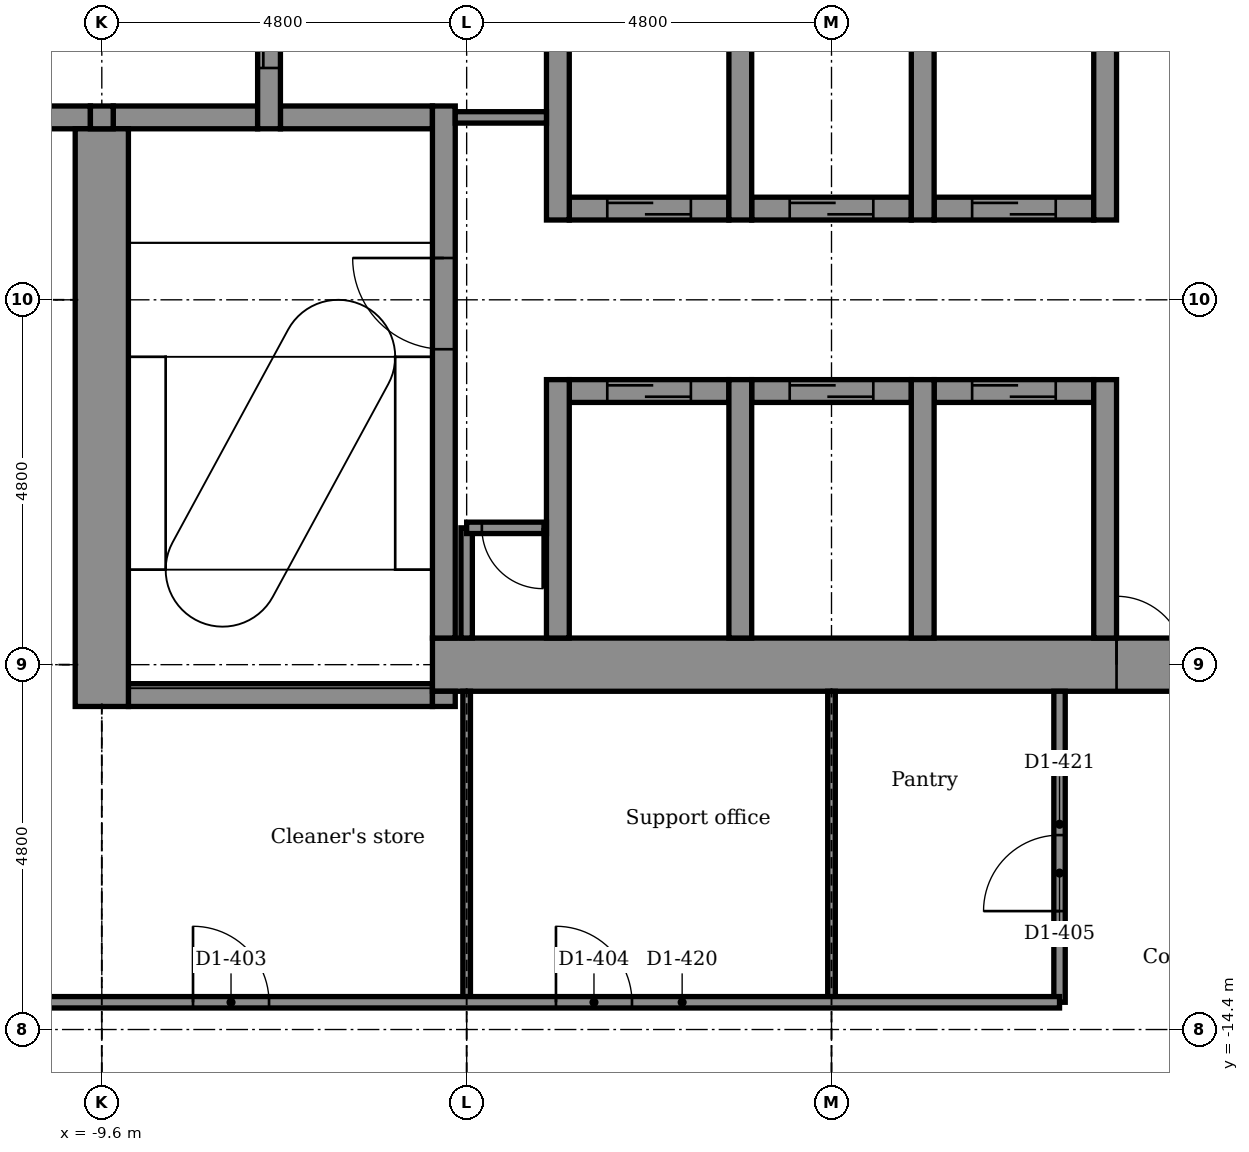
"""IFC4 building model, lengths in metres.
Left out: names, types, materials, properties, quantities, classifications, styles, units other than length and angle.
Written with IfcOpenShell. Run it as: python <this file> out.ifc"""

import sys

from ifc_helpers import new_model, si_unit, direction, frame, frame_2d, origin, place, context, subcontext, project, spatial, rectangle, extrude, element, fill, save


model = new_model("IFC4")
c1 = context("Model", 3, precision=1e-05, world=origin(), true_north=direction((0.0, 1.0)))
c2 = subcontext(c1, "Body", "Model", "MODEL_VIEW")
j1 = project(units=[si_unit("LENGTHUNIT", "METRE"), si_unit("PLANEANGLEUNIT", "RADIAN")], contexts=[c1])
p1 = place(None, origin())
s1 = spatial("IfcSite", under=j1, at=p1, CompositionType="ELEMENT")
p2 = place(p1, origin())
s2 = spatial("IfcBuilding", under=s1, at=p2, CompositionType="ELEMENT")
p3 = place(p2, frame((0.0, 0.0, 138.8)))
s3 = spatial("IfcBuildingStorey", under=s2, at=p3, CompositionType="ELEMENT", Elevation=138.8)
p4 = place(p3, frame((-9.25, -10.0, -0.15), z_axis=(0.0, 0.0, 1.0), x_axis=(1.0, 0.0, 0.0)))
e1 = element("IfcWall", 1, at=p4, inside=s3, PredefinedType="STANDARD", context=c2, shape_type="SweptSolid", body=[
    extrude(rectangle(XDim=4.0, YDim=0.3, at=frame_2d((2.0, 0.0))), origin(), (0.0, 0.0, 1.0), 3.9),
])
p5 = place(p3, frame((-5.25, -9.6, -0.15), z_axis=(0.0, 0.0, 1.0), x_axis=(1.0, 0.0, 0.0)))
e2 = element("IfcWall", 2, at=p5, inside=s3, PredefinedType="SHEAR", context=c2, shape_type="SweptSolid", body=[
    extrude(rectangle(XDim=10.2, YDim=0.7, at=frame_2d((5.1, 0.0))), origin(), (0.0, 0.0, 1.0), 3.9),
])
p6 = place(p5, frame((9.0, 0.0, 0.15)))
e3 = element("IfcOpeningElement", 3, at=p6, cuts=e2, PredefinedType="OPENING", context=c2, shape_type="SweptSolid", body=[
    extrude(rectangle(XDim=0.9, YDim=2.1, at=frame_2d((0.45, 1.05))), frame((0.0, 0.36, 0.0), z_axis=(0.0, -1.0, 0.0), x_axis=(1.0, 0.0, 0.0)), (0.0, 0.0, 1.0), 0.72),
])
p7 = place(p3, frame((-3.45, -6.0, -0.15), z_axis=(0.0, 0.0, 1.0), x_axis=(1.0, 0.0, 0.0)))
e4 = element("IfcWall", 4, at=p7, inside=s3, PredefinedType="STANDARD", context=c2, shape_type="SweptSolid", body=[
    extrude(rectangle(XDim=2.1, YDim=0.3, at=frame_2d((1.05, 0.0))), origin(), (0.0, 0.0, 1.0), 3.9),
])
p8 = place(p7, frame((0.5, 0.0, 0.15)))
e5 = element("IfcOpeningElement", 5, at=p8, cuts=e4, PredefinedType="OPENING", context=c2, shape_type="SweptSolid", body=[
    extrude(rectangle(XDim=1.1, YDim=2.1, at=frame_2d((0.55, 1.05))), frame((0.0, 0.16, 0.0), z_axis=(0.0, -1.0, 0.0), x_axis=(1.0, 0.0, 0.0)), (0.0, 0.0, 1.0), 0.32),
])
p9 = place(p3, frame((-1.05, -6.0, -0.15), z_axis=(0.0, 0.0, 1.0), x_axis=(1.0, 0.0, 0.0)))
e6 = element("IfcWall", 6, at=p9, inside=s3, PredefinedType="STANDARD", context=c2, shape_type="SweptSolid", body=[
    extrude(rectangle(XDim=2.1, YDim=0.3, at=frame_2d((1.05, 0.0))), origin(), (0.0, 0.0, 1.0), 3.9),
])
p10 = place(p9, frame((0.5, 0.0, 0.15)))
e7 = element("IfcOpeningElement", 7, at=p10, cuts=e6, PredefinedType="OPENING", context=c2, shape_type="SweptSolid", body=[
    extrude(rectangle(XDim=1.1, YDim=2.1, at=frame_2d((0.55, 1.05))), frame((0.0, 0.16, 0.0), z_axis=(0.0, -1.0, 0.0), x_axis=(1.0, 0.0, 0.0)), (0.0, 0.0, 1.0), 0.32),
])
p11 = place(p3, frame((1.35, -6.0, -0.15), z_axis=(0.0, 0.0, 1.0), x_axis=(1.0, 0.0, 0.0)))
e8 = element("IfcWall", 8, at=p11, inside=s3, PredefinedType="STANDARD", context=c2, shape_type="SweptSolid", body=[
    extrude(rectangle(XDim=2.1, YDim=0.3, at=frame_2d((1.05, 0.0))), origin(), (0.0, 0.0, 1.0), 3.9),
])
p12 = place(p11, frame((0.5, 0.0, 0.15)))
e9 = element("IfcOpeningElement", 9, at=p12, cuts=e8, PredefinedType="OPENING", context=c2, shape_type="SweptSolid", body=[
    extrude(rectangle(XDim=1.1, YDim=2.1, at=frame_2d((0.55, 1.05))), frame((0.0, 0.16, 0.0), z_axis=(0.0, -1.0, 0.0), x_axis=(1.0, 0.0, 0.0)), (0.0, 0.0, 1.0), 0.32),
])
p13 = place(p3, frame((-3.45, -3.6, -0.15), z_axis=(0.0, 0.0, 1.0), x_axis=(1.0, 0.0, 0.0)))
e10 = element("IfcWall", 10, at=p13, inside=s3, PredefinedType="STANDARD", context=c2, shape_type="SweptSolid", body=[
    extrude(rectangle(XDim=2.1, YDim=0.3, at=frame_2d((1.05, 0.0))), origin(), (0.0, 0.0, 1.0), 3.9),
])
p14 = place(p13, frame((0.5, 0.0, 0.15)))
e11 = element("IfcOpeningElement", 11, at=p14, cuts=e10, PredefinedType="OPENING", context=c2, shape_type="SweptSolid", body=[
    extrude(rectangle(XDim=1.1, YDim=2.1, at=frame_2d((0.55, 1.05))), frame((0.0, 0.16, 0.0), z_axis=(0.0, -1.0, 0.0), x_axis=(1.0, 0.0, 0.0)), (0.0, 0.0, 1.0), 0.32),
])
p15 = place(p3, frame((-1.05, -3.6, -0.15), z_axis=(0.0, 0.0, 1.0), x_axis=(1.0, 0.0, 0.0)))
e12 = element("IfcWall", 12, at=p15, inside=s3, PredefinedType="STANDARD", context=c2, shape_type="SweptSolid", body=[
    extrude(rectangle(XDim=2.1, YDim=0.3, at=frame_2d((1.05, 0.0))), origin(), (0.0, 0.0, 1.0), 3.9),
])
p16 = place(p15, frame((0.5, 0.0, 0.15)))
e13 = element("IfcOpeningElement", 13, at=p16, cuts=e12, PredefinedType="OPENING", context=c2, shape_type="SweptSolid", body=[
    extrude(rectangle(XDim=1.1, YDim=2.1, at=frame_2d((0.55, 1.05))), frame((0.0, 0.16, 0.0), z_axis=(0.0, -1.0, 0.0), x_axis=(1.0, 0.0, 0.0)), (0.0, 0.0, 1.0), 0.32),
])
p17 = place(p3, frame((1.35, -3.6, -0.15), z_axis=(0.0, 0.0, 1.0), x_axis=(1.0, 0.0, 0.0)))
e14 = element("IfcWall", 14, at=p17, inside=s3, PredefinedType="STANDARD", context=c2, shape_type="SweptSolid", body=[
    extrude(rectangle(XDim=2.1, YDim=0.3, at=frame_2d((1.05, 0.0))), origin(), (0.0, 0.0, 1.0), 3.9),
])
p18 = place(p17, frame((0.5, 0.0, 0.15)))
e15 = element("IfcOpeningElement", 15, at=p18, cuts=e14, PredefinedType="OPENING", context=c2, shape_type="SweptSolid", body=[
    extrude(rectangle(XDim=1.1, YDim=2.1, at=frame_2d((0.55, 1.05))), frame((0.0, 0.16, 0.0), z_axis=(0.0, -1.0, 0.0), x_axis=(1.0, 0.0, 0.0)), (0.0, 0.0, 1.0), 0.32),
])
p19 = place(p3, frame((-10.85, -2.4, -0.15), z_axis=(0.0, 0.0, 1.0), x_axis=(1.0, 0.0, 0.0)))
e16 = element("IfcWall", 16, at=p19, inside=s3, PredefinedType="STANDARD", context=c2, shape_type="SweptSolid", body=[
    extrude(rectangle(XDim=1.1, YDim=0.3, at=frame_2d((0.55, 0.0))), origin(), (0.0, 0.0, 1.0), 3.9),
])
p20 = place(p3, frame((-9.45, -2.4, -0.15), z_axis=(0.0, 0.0, 1.0), x_axis=(1.0, 0.0, 0.0)))
e17 = element("IfcWall", 17, at=p20, inside=s3, PredefinedType="STANDARD", context=c2, shape_type="SweptSolid", body=[
    extrude(rectangle(XDim=1.9, YDim=0.3, at=frame_2d((0.95, 0.0))), origin(), (0.0, 0.0, 1.0), 3.9),
])
p21 = place(p3, frame((-7.25, -2.4, -0.15), z_axis=(0.0, 0.0, 1.0), x_axis=(1.0, 0.0, 0.0)))
e18 = element("IfcWall", 18, at=p21, inside=s3, PredefinedType="STANDARD", context=c2, shape_type="SweptSolid", body=[
    extrude(rectangle(XDim=2.0, YDim=0.3, at=frame_2d((1.0, 0.0))), origin(), (0.0, 0.0, 1.0), 3.9),
])
p22 = place(p3, frame((-9.6, -10.15, -0.15), z_axis=(0.0, 0.0, 1.0), x_axis=(0.0, 1.0, 0.0)))
e19 = element("IfcWall", 19, at=p22, inside=s3, PredefinedType="SHEAR", context=c2, shape_type="SweptSolid", body=[
    extrude(rectangle(XDim=7.6, YDim=0.7, at=frame_2d((3.8, 0.0))), origin(), (0.0, 0.0, 1.0), 3.9),
])
p23 = place(p3, frame((-9.6, -2.55, -0.15), z_axis=(0.0, 0.0, 1.0), x_axis=(0.0, 1.0, 0.0)))
e20 = element("IfcWall", 20, at=p23, inside=s3, PredefinedType="STANDARD", context=c2, shape_type="SweptSolid", body=[
    extrude(rectangle(XDim=0.3, YDim=0.3, at=frame_2d((0.15, 0.0))), origin(), (0.0, 0.0, 1.0), 3.9),
])
p24 = place(p3, frame((-7.4, -2.55, -0.15), z_axis=(0.0, 0.0, 1.0), x_axis=(0.0, 1.0, 0.0)))
e21 = element("IfcWall", 21, at=p24, inside=s3, PredefinedType="STANDARD", context=c2, shape_type="SweptSolid", body=[
    extrude(rectangle(XDim=5.1, YDim=0.3, at=frame_2d((2.55, 0.0))), origin(), (0.0, 0.0, 1.0), 3.9),
])
p25 = place(p24, frame((0.8, 0.0, 0.15)))
e22 = element("IfcOpeningElement", 22, at=p25, cuts=e21, PredefinedType="OPENING", context=c2, shape_type="SweptSolid", body=[
    extrude(rectangle(XDim=1.1, YDim=2.1, at=frame_2d((0.55, 1.05))), frame((0.0, 0.16, 0.0), z_axis=(0.0, -1.0, 0.0), x_axis=(1.0, 0.0, 0.0)), (0.0, 0.0, 1.0), 0.32),
])
p26 = place(p24, frame((3.2, 0.0, 0.15)))
e23 = element("IfcOpeningElement", 23, at=p26, cuts=e21, PredefinedType="OPENING", context=c2, shape_type="SweptSolid", body=[
    extrude(rectangle(XDim=1.1, YDim=2.1, at=frame_2d((0.55, 1.05))), frame((0.0, 0.16, 0.0), z_axis=(0.0, -1.0, 0.0), x_axis=(1.0, 0.0, 0.0)), (0.0, 0.0, 1.0), 0.32),
])
p27 = place(p3, frame((-5.1, -10.15, -0.15), z_axis=(0.0, 0.0, 1.0), x_axis=(0.0, 1.0, 0.0)))
e24 = element("IfcWall", 24, at=p27, inside=s3, PredefinedType="STANDARD", context=c2, shape_type="SweptSolid", body=[
    extrude(rectangle(XDim=0.2, YDim=0.3, at=frame_2d((0.1, 0.0))), origin(), (0.0, 0.0, 1.0), 3.9),
])
p28 = place(p3, frame((-5.1, -9.25, -0.15), z_axis=(0.0, 0.0, 1.0), x_axis=(0.0, 1.0, 0.0)))
e25 = element("IfcWall", 25, at=p28, inside=s3, PredefinedType="STANDARD", context=c2, shape_type="SweptSolid", body=[
    extrude(rectangle(XDim=7.0, YDim=0.3, at=frame_2d((3.5, 0.0))), origin(), (0.0, 0.0, 1.0), 3.9),
])
p29 = place(p28, frame((3.8, 0.0, 0.15)))
e26 = element("IfcOpeningElement", 26, at=p29, cuts=e25, PredefinedType="OPENING", context=c2, shape_type="SweptSolid", body=[
    extrude(rectangle(XDim=1.2, YDim=2.1, at=frame_2d((0.6, 1.05))), frame((0.0, 0.16, 0.0), z_axis=(0.0, -1.0, 0.0), x_axis=(1.0, 0.0, 0.0)), (0.0, 0.0, 1.0), 0.32),
])
p30 = place(p3, frame((-3.6, -9.25, -0.15), z_axis=(0.0, 0.0, 1.0), x_axis=(0.0, 1.0, 0.0)))
e27 = element("IfcWall", 27, at=p30, inside=s3, PredefinedType="STANDARD", context=c2, shape_type="SweptSolid", body=[
    extrude(rectangle(XDim=3.4, YDim=0.3, at=frame_2d((1.7, 0.0))), origin(), (0.0, 0.0, 1.0), 3.9),
])
p31 = place(p3, frame((-3.6, -3.75, -0.15), z_axis=(0.0, 0.0, 1.0), x_axis=(0.0, 1.0, 0.0)))
e28 = element("IfcWall", 28, at=p31, inside=s3, PredefinedType="STANDARD", context=c2, shape_type="SweptSolid", body=[
    extrude(rectangle(XDim=7.5, YDim=0.3, at=frame_2d((3.75, 0.0))), origin(), (0.0, 0.0, 1.0), 3.9),
])
p32 = place(p3, frame((-1.2, -9.25, -0.15), z_axis=(0.0, 0.0, 1.0), x_axis=(0.0, 1.0, 0.0)))
e29 = element("IfcWall", 29, at=p32, inside=s3, PredefinedType="STANDARD", context=c2, shape_type="SweptSolid", body=[
    extrude(rectangle(XDim=3.4, YDim=0.3, at=frame_2d((1.7, 0.0))), origin(), (0.0, 0.0, 1.0), 3.9),
])
p33 = place(p3, frame((-1.2, -3.75, -0.15), z_axis=(0.0, 0.0, 1.0), x_axis=(0.0, 1.0, 0.0)))
e30 = element("IfcWall", 30, at=p33, inside=s3, PredefinedType="STANDARD", context=c2, shape_type="SweptSolid", body=[
    extrude(rectangle(XDim=7.5, YDim=0.3, at=frame_2d((3.75, 0.0))), origin(), (0.0, 0.0, 1.0), 3.9),
])
p34 = place(p3, frame((1.2, -9.25, -0.15), z_axis=(0.0, 0.0, 1.0), x_axis=(0.0, 1.0, 0.0)))
e31 = element("IfcWall", 31, at=p34, inside=s3, PredefinedType="STANDARD", context=c2, shape_type="SweptSolid", body=[
    extrude(rectangle(XDim=3.4, YDim=0.3, at=frame_2d((1.7, 0.0))), origin(), (0.0, 0.0, 1.0), 3.9),
])
p35 = place(p3, frame((1.2, -3.75, -0.15), z_axis=(0.0, 0.0, 1.0), x_axis=(0.0, 1.0, 0.0)))
e32 = element("IfcWall", 32, at=p35, inside=s3, PredefinedType="STANDARD", context=c2, shape_type="SweptSolid", body=[
    extrude(rectangle(XDim=7.5, YDim=0.3, at=frame_2d((3.75, 0.0))), origin(), (0.0, 0.0, 1.0), 3.9),
])
p36 = place(p3, frame((3.6, -9.25, -0.15), z_axis=(0.0, 0.0, 1.0), x_axis=(0.0, 1.0, 0.0)))
e33 = element("IfcWall", 33, at=p36, inside=s3, PredefinedType="STANDARD", context=c2, shape_type="SweptSolid", body=[
    extrude(rectangle(XDim=3.4, YDim=0.3, at=frame_2d((1.7, 0.0))), origin(), (0.0, 0.0, 1.0), 3.9),
])
p37 = place(p3, frame((3.6, -3.75, -0.15), z_axis=(0.0, 0.0, 1.0), x_axis=(0.0, 1.0, 0.0)))
e34 = element("IfcWall", 34, at=p37, inside=s3, PredefinedType="STANDARD", context=c2, shape_type="SweptSolid", body=[
    extrude(rectangle(XDim=7.5, YDim=0.3, at=frame_2d((3.75, 0.0))), origin(), (0.0, 0.0, 1.0), 3.9),
])
p38 = place(p3, frame((3.0, -14.042, 0.0), z_axis=(0.0, 0.0, 1.0), x_axis=(0.0, 1.0, 0.0)))
e35 = element("IfcWall", 35, at=p38, inside=s3, PredefinedType="PARTITIONING", context=c2, shape_type="SweptSolid", body=[
    extrude(rectangle(XDim=4.092, YDim=0.15, at=frame_2d((2.046, 0.0))), origin(), (0.0, 0.0, 1.0), 3.75),
])
p39 = place(p38, frame((1.199, 0.0, 0.0)))
e36 = element("IfcOpeningElement", 36, at=p39, cuts=e35, PredefinedType="OPENING", context=c2, shape_type="SweptSolid", body=[
    extrude(rectangle(XDim=1.0, YDim=2.1, at=frame_2d((0.5, 1.05))), frame((0.0, 0.085, 0.0), z_axis=(0.0, -1.0, 0.0), x_axis=(1.0, 0.0, 0.0)), (0.0, 0.0, 1.0), 0.17),
])
for number, where, z_axis, x_axis in (
    (37, (0.0, -14.042, 0.0), (0.0, 0.0, 1.0), (0.0, 1.0, 0.0)),
    (38, (-4.8, -14.042, 0.0), (0.0, 0.0, 1.0), (0.0, 1.0, 0.0)),
):
    element("IfcWall", number, at=place(p3, frame(where, z_axis=z_axis, x_axis=x_axis)), inside=s3, PredefinedType="PARTITIONING", context=c2, shape_type="SweptSolid", body=[
        extrude(rectangle(XDim=4.092, YDim=0.1, at=frame_2d((2.046, 0.0))), origin(), (0.0, 0.0, 1.0), 3.066),
    ])
p40 = place(p3, frame((-4.8, -9.25, 0.0), z_axis=(0.0, 0.0, 1.0), x_axis=(0.0, 1.0, 0.0)))
e39 = element("IfcWall", 39, at=p40, inside=s3, PredefinedType="PARTITIONING", context=c2, shape_type="SweptSolid", body=[
    extrude(rectangle(XDim=1.45, YDim=0.15, at=frame_2d((0.725, 0.0))), origin(), (0.0, 0.0, 1.0), 3.75),
])
p41 = place(p3, frame((-17.021, -14.042, 0.0), z_axis=(0.0, 0.0, 1.0), x_axis=(1.0, 0.0, 0.0)))
e40 = element("IfcWall", 40, at=p41, inside=s3, PredefinedType="PARTITIONING", context=c2, shape_type="SweptSolid", body=[
    extrude(rectangle(XDim=20.021, YDim=0.15, at=frame_2d((10.011, 0.0))), origin(), (0.0, 0.0, 1.0), 3.75),
])
p42 = place(p41, frame((8.621, 0.0, 0.0)))
e41 = element("IfcOpeningElement", 41, at=p42, cuts=e40, PredefinedType="OPENING", context=c2, shape_type="SweptSolid", body=[
    extrude(rectangle(XDim=1.0, YDim=2.1, at=frame_2d((0.5, 1.05))), frame((0.0, 0.085, 0.0), z_axis=(0.0, -1.0, 0.0), x_axis=(1.0, 0.0, 0.0)), (0.0, 0.0, 1.0), 0.17),
])
p43 = place(p41, frame((13.396, 0.0, 0.0)))
e42 = element("IfcOpeningElement", 42, at=p43, cuts=e40, PredefinedType="OPENING", context=c2, shape_type="SweptSolid", body=[
    extrude(rectangle(XDim=1.0, YDim=2.1, at=frame_2d((0.5, 1.05))), frame((0.0, 0.085, 0.0), z_axis=(0.0, -1.0, 0.0), x_axis=(1.0, 0.0, 0.0)), (0.0, 0.0, 1.0), 0.17),
])
p44 = place(p3, frame((-4.8, -7.8, 0.0), z_axis=(0.0, 0.0, 1.0), x_axis=(1.0, 0.0, 0.0)))
e43 = element("IfcWall", 43, at=p44, inside=s3, PredefinedType="PARTITIONING", context=c2, shape_type="SweptSolid", body=[
    extrude(rectangle(XDim=1.05, YDim=0.15, at=frame_2d((0.525, 0.0))), origin(), (0.0, 0.0, 1.0), 3.75),
])
p45 = place(p44, frame((0.2, 0.0, 0.0)))
e44 = element("IfcOpeningElement", 44, at=p45, cuts=e43, PredefinedType="OPENING", context=c2, shape_type="SweptSolid", body=[
    extrude(rectangle(XDim=0.8, YDim=2.1, at=frame_2d((0.4, 1.05))), frame((0.0, 0.085, 0.0), z_axis=(0.0, -1.0, 0.0), x_axis=(1.0, 0.0, 0.0)), (0.0, 0.0, 1.0), 0.17),
])
p46 = place(p3, frame((-4.95, -2.4, 0.0), z_axis=(0.0, 0.0, 1.0), x_axis=(1.0, 0.0, 0.0)))
e45 = element("IfcWall", 45, at=p46, inside=s3, PredefinedType="PARTITIONING", context=c2, shape_type="SweptSolid", body=[
    extrude(rectangle(XDim=1.2, YDim=0.15, at=frame_2d((0.6, 0.0))), origin(), (0.0, 0.0, 1.0), 3.75),
])
p47 = place(p45, frame((0.8, 0.0, 0.0), z_axis=(0.0, 0.0, 1.0), x_axis=(-1.0, 0.0, 0.0)))
e46 = element("IfcDoor", 46, at=p47, inside=s3, OperationType="SINGLE_SWING_RIGHT", PredefinedType="DOOR", context=c2, shape_type="SweptSolid", body=[
    extrude(rectangle(XDim=0.8, YDim=2.1, at=frame_2d((0.4, 1.05))), frame((0.0, 0.025, 0.0), z_axis=(0.0, -1.0, 0.0), x_axis=(1.0, 0.0, 0.0)), (0.0, 0.0, 1.0), 0.05),
])
fill(e44, e46)
p48 = place(p42, origin())
e47 = element("IfcDoor", 47, at=p48, inside=s3, OperationType="SINGLE_SWING_LEFT", PredefinedType="DOOR", context=c2, shape_type="SweptSolid", body=[
    extrude(rectangle(XDim=1.0, YDim=2.1, at=frame_2d((0.5, 1.05))), frame((0.0, 0.025, 0.0), z_axis=(0.0, -1.0, 0.0), x_axis=(1.0, 0.0, 0.0)), (0.0, 0.0, 1.0), 0.05),
])
fill(e41, e47)
p49 = place(p43, origin())
e48 = element("IfcDoor", 48, at=p49, inside=s3, OperationType="SINGLE_SWING_LEFT", PredefinedType="DOOR", context=c2, shape_type="SweptSolid", body=[
    extrude(rectangle(XDim=1.0, YDim=2.1, at=frame_2d((0.5, 1.05))), frame((0.0, 0.025, 0.0), z_axis=(0.0, -1.0, 0.0), x_axis=(1.0, 0.0, 0.0)), (0.0, 0.0, 1.0), 0.05),
])
fill(e42, e48)
p50 = place(p39, origin())
e49 = element("IfcDoor", 49, at=p50, inside=s3, OperationType="SINGLE_SWING_LEFT", PredefinedType="DOOR", context=c2, shape_type="SweptSolid", body=[
    extrude(rectangle(XDim=1.0, YDim=2.1, at=frame_2d((0.5, 1.05))), frame((0.0, 0.025, 0.0), z_axis=(0.0, -1.0, 0.0), x_axis=(1.0, 0.0, 0.0)), (0.0, 0.0, 1.0), 0.05),
])
fill(e36, e49)
p51 = place(p25, origin())
e50 = element("IfcDoor", 50, at=p51, inside=s3, OperationType="DOUBLE_DOOR_SLIDING", PredefinedType="DOOR", context=c2, shape_type="SweptSolid", body=[
    extrude(rectangle(XDim=1.1, YDim=2.1, at=frame_2d((0.55, 1.05))), frame((0.0, 0.025, 0.0), z_axis=(0.0, -1.0, 0.0), x_axis=(1.0, 0.0, 0.0)), (0.0, 0.0, 1.0), 0.05),
])
fill(e22, e50)
p52 = place(p14, origin())
e51 = element("IfcDoor", 51, at=p52, inside=s3, OperationType="DOUBLE_DOOR_SLIDING", PredefinedType="DOOR", context=c2, shape_type="SweptSolid", body=[
    extrude(rectangle(XDim=1.1, YDim=2.1, at=frame_2d((0.55, 1.05))), frame((0.0, 0.025, 0.0), z_axis=(0.0, -1.0, 0.0), x_axis=(1.0, 0.0, 0.0)), (0.0, 0.0, 1.0), 0.05),
])
fill(e11, e51)
p53 = place(p16, origin())
e52 = element("IfcDoor", 52, at=p53, inside=s3, OperationType="DOUBLE_DOOR_SLIDING", PredefinedType="DOOR", context=c2, shape_type="SweptSolid", body=[
    extrude(rectangle(XDim=1.1, YDim=2.1, at=frame_2d((0.55, 1.05))), frame((0.0, 0.025, 0.0), z_axis=(0.0, -1.0, 0.0), x_axis=(1.0, 0.0, 0.0)), (0.0, 0.0, 1.0), 0.05),
])
fill(e13, e52)
p54 = place(p18, origin())
e53 = element("IfcDoor", 53, at=p54, inside=s3, OperationType="DOUBLE_DOOR_SLIDING", PredefinedType="DOOR", context=c2, shape_type="SweptSolid", body=[
    extrude(rectangle(XDim=1.1, YDim=2.1, at=frame_2d((0.55, 1.05))), frame((0.0, 0.025, 0.0), z_axis=(0.0, -1.0, 0.0), x_axis=(1.0, 0.0, 0.0)), (0.0, 0.0, 1.0), 0.05),
])
fill(e15, e53)
p55 = place(p8, origin())
e54 = element("IfcDoor", 54, at=p55, inside=s3, OperationType="DOUBLE_DOOR_SLIDING", PredefinedType="DOOR", context=c2, shape_type="SweptSolid", body=[
    extrude(rectangle(XDim=1.1, YDim=2.1, at=frame_2d((0.55, 1.05))), frame((0.0, 0.025, 0.0), z_axis=(0.0, -1.0, 0.0), x_axis=(1.0, 0.0, 0.0)), (0.0, 0.0, 1.0), 0.05),
])
fill(e5, e54)
p56 = place(p10, origin())
e55 = element("IfcDoor", 55, at=p56, inside=s3, OperationType="DOUBLE_DOOR_SLIDING", PredefinedType="DOOR", context=c2, shape_type="SweptSolid", body=[
    extrude(rectangle(XDim=1.1, YDim=2.1, at=frame_2d((0.55, 1.05))), frame((0.0, 0.025, 0.0), z_axis=(0.0, -1.0, 0.0), x_axis=(1.0, 0.0, 0.0)), (0.0, 0.0, 1.0), 0.05),
])
fill(e7, e55)
p57 = place(p12, origin())
e56 = element("IfcDoor", 56, at=p57, inside=s3, OperationType="DOUBLE_DOOR_SLIDING", PredefinedType="DOOR", context=c2, shape_type="SweptSolid", body=[
    extrude(rectangle(XDim=1.1, YDim=2.1, at=frame_2d((0.55, 1.05))), frame((0.0, 0.025, 0.0), z_axis=(0.0, -1.0, 0.0), x_axis=(1.0, 0.0, 0.0)), (0.0, 0.0, 1.0), 0.05),
])
fill(e9, e56)
p58 = place(p29, origin())
e57 = element("IfcDoor", 57, at=p58, inside=s3, OperationType="SINGLE_SWING_RIGHT", PredefinedType="DOOR", context=c2, shape_type="SweptSolid", body=[
    extrude(rectangle(XDim=1.2, YDim=2.1, at=frame_2d((0.6, 1.05))), frame((0.0, 0.025, 0.0), z_axis=(0.0, -1.0, 0.0), x_axis=(1.0, 0.0, 0.0)), (0.0, 0.0, 1.0), 0.05),
])
fill(e26, e57)
p59 = place(p6, origin())
e58 = element("IfcDoor", 58, at=p59, inside=s3, OperationType="SINGLE_SWING_LEFT", PredefinedType="DOOR", context=c2, shape_type="SweptSolid", body=[
    extrude(rectangle(XDim=0.9, YDim=2.1, at=frame_2d((0.45, 1.05))), frame((0.0, 0.025, 0.0), z_axis=(0.0, -1.0, 0.0), x_axis=(1.0, 0.0, 0.0)), (0.0, 0.0, 1.0), 0.05),
])
fill(e3, e58)
save(model, sys.argv[1])
